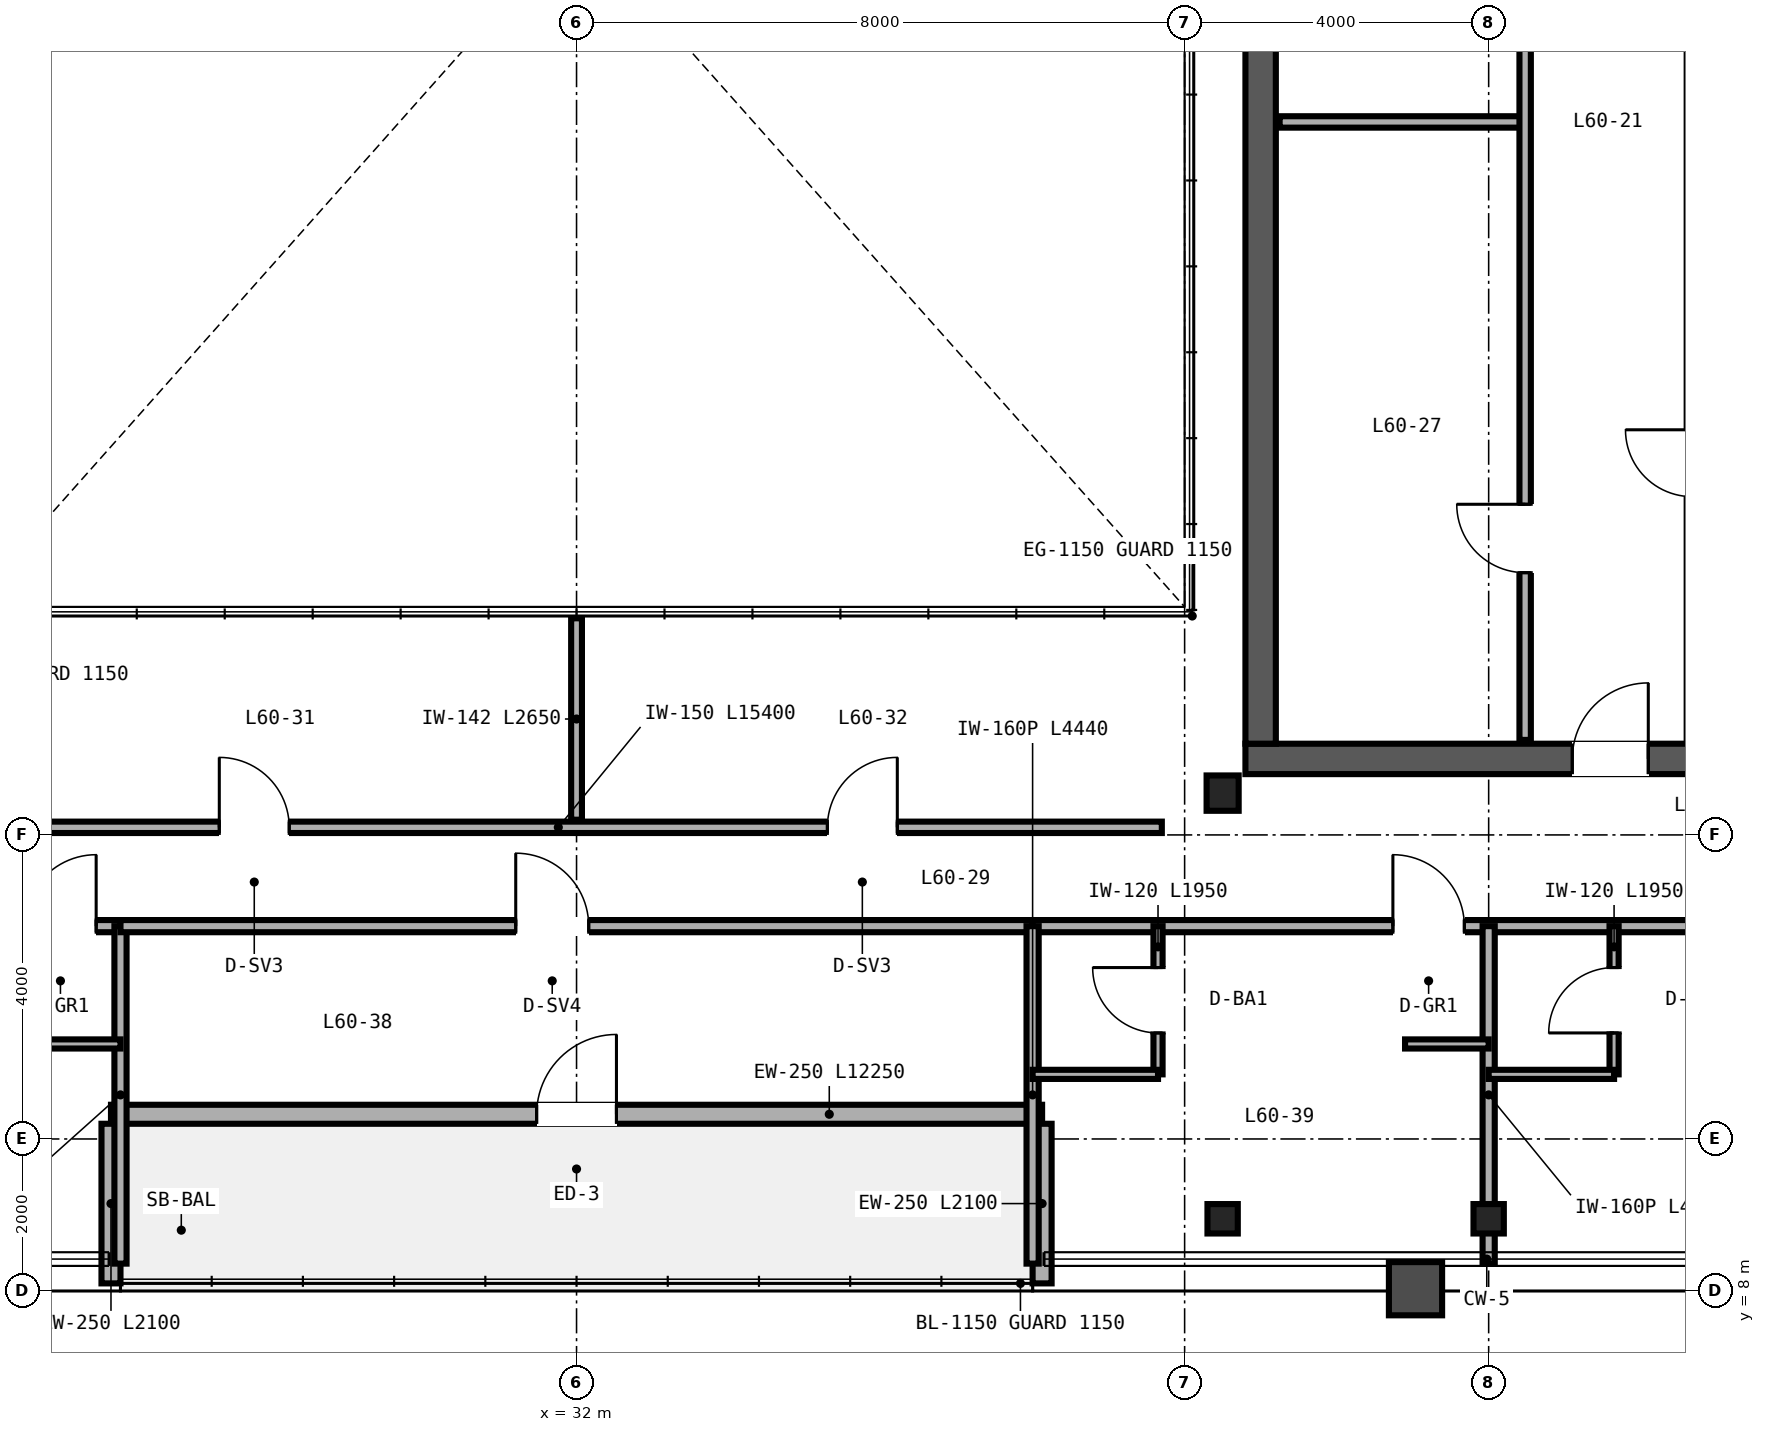
"""IFC4 building model, lengths in metres.
Left out: names, types, materials, properties, quantities, classifications, styles, units other than length and angle.
Written with IfcOpenShell. Run it as: python <this file> out.ifc"""

import sys

from ifc_helpers import new_model, si_unit, direction, frame, frame_2d, origin, origin_2d, place, context, subcontext, project, spatial, rectangle, i_section, extrude, source, transform, mapped, element, fill, save


model = new_model("IFC4")
c1 = context("Model", 3, precision=1e-05, world=origin(), true_north=direction((0.0, 1.0)))
c2 = subcontext(c1, "Body", "Model", "MODEL_VIEW")
j1 = project(units=[si_unit("LENGTHUNIT", "METRE"), si_unit("PLANEANGLEUNIT", "RADIAN")], contexts=[c1])
p1 = place(None, origin())
s1 = spatial("IfcSite", under=j1, at=p1, CompositionType="ELEMENT")
p2 = place(p1, origin())
s2 = spatial("IfcBuilding", under=s1, at=p2, CompositionType="ELEMENT")
p3 = place(p2, frame((0.0, 0.0, 240.0)))
s3 = spatial("IfcBuildingStorey", under=s2, at=p3, CompositionType="ELEMENT", Elevation=240.0)
p4 = place(p3, frame((40.8, 15.0, 0.0), z_axis=(0.0, 0.0, 1.0), x_axis=(1.0, 0.0, 0.0)))
e1 = element("IfcWall", 1, at=p4, inside=s3, PredefinedType="SHEAR", context=c2, shape_type="SweptSolid", body=[
    extrude(rectangle(XDim=12.4, YDim=0.4, at=frame_2d((6.2, 0.0))), origin(), (0.0, 0.0, 1.0), 3.38),
])
p5 = place(p4, frame((4.3, 0.0, 0.0)))
e2 = element("IfcOpeningElement", 2, at=p5, cuts=e1, PredefinedType="OPENING", context=c2, shape_type="SweptSolid", body=[
    extrude(rectangle(XDim=1.0, YDim=2.15, at=frame_2d((0.5, 1.075))), frame((0.0, 0.21, 0.0), z_axis=(0.0, -1.0, 0.0), x_axis=(1.0, 0.0, 0.0)), (0.0, 0.0, 1.0), 0.42),
])
p6 = place(p3, frame((41.0, 15.2, 0.0), z_axis=(0.0, 0.0, 1.0), x_axis=(0.0, 1.0, 0.0)))
e3 = element("IfcWall", 3, at=p6, inside=s3, PredefinedType="SHEAR", context=c2, shape_type="SweptSolid", body=[
    extrude(rectangle(XDim=21.6, YDim=0.4, at=frame_2d((10.8, 0.0))), origin(), (0.0, 0.0, 1.0), 3.38),
])
m1 = source(origin(), c2, "Body", "SweptSolid", [
    extrude(i_section(OverallWidth=0.422, OverallDepth=0.465, WebThickness=0.045, FlangeThickness=0.073, FilletRadius=0.025, at=origin_2d()), origin(), (0.0, 0.0, 1.0), 3.38),
])
p7 = place(p3, frame((40.5, 14.55, 0.0), z_axis=(0.0, 0.0, 1.0), x_axis=(1.0, 0.0, 0.0)))
e4 = element("IfcColumn", 4, at=p7, inside=s3, PredefinedType="COLUMN", context=c2, shape_type="MappedRepresentation", body=[
    mapped(m1, transform((0.0, 0.0, 0.0), scale=1.0)),
])
m2 = source(origin(), c2, "Body", "SweptSolid", [
    extrude(i_section(OverallWidth=0.399, OverallDepth=0.387, WebThickness=0.021, FlangeThickness=0.033, FilletRadius=0.025, at=origin_2d()), origin(), (0.0, 0.0, 1.0), 3.38),
])
for number, where, z_axis, x_axis in (
    (5, (40.5, 8.95, 0.0), (0.0, 0.0, 1.0), (1.0, 0.0, 0.0)),
    (6, (44.0, 8.95, 0.0), (0.0, 0.0, 1.0), (1.0, 0.0, 0.0)),
):
    element("IfcColumn", number, at=place(p3, frame(where, z_axis=z_axis, x_axis=x_axis)), inside=s3, PredefinedType="COLUMN", context=c2, shape_type="MappedRepresentation", body=[
        mapped(m2, transform((0.0, 0.0, 0.0), scale=1.0)),
    ])
p8 = place(p3, frame((25.875, 10.325, 0.0), z_axis=(0.0, 0.0, 1.0), x_axis=(1.0, 0.0, 0.0)))
e7 = element("IfcWall", 7, at=p8, inside=s3, PredefinedType="SOLIDWALL", context=c2, shape_type="SweptSolid", body=[
    extrude(rectangle(XDim=12.25, YDim=0.25, at=frame_2d((6.125, 0.0))), origin(), (0.0, 0.0, 1.0), 3.38),
])
p9 = place(p8, frame((5.6, 0.0, 0.0)))
e8 = element("IfcOpeningElement", 8, at=p9, cuts=e7, PredefinedType="OPENING", context=c2, shape_type="SweptSolid", body=[
    extrude(rectangle(XDim=1.05, YDim=2.15, at=frame_2d((0.525, 1.075))), frame((0.0, 0.135, 0.0), z_axis=(0.0, -1.0, 0.0), x_axis=(1.0, 0.0, 0.0)), (0.0, 0.0, 1.0), 0.27),
])
for number, where, z_axis, x_axis in (
    (9, (25.875, 8.1, 0.0), (0.0, 0.0, 1.0), (0.0, 1.0, 0.0)),
    (10, (38.125, 8.1, 0.0), (0.0, 0.0, 1.0), (0.0, 1.0, 0.0)),
):
    element("IfcWall", number, at=place(p3, frame(where, z_axis=z_axis, x_axis=x_axis)), inside=s3, PredefinedType="SOLIDWALL", context=c2, shape_type="SweptSolid", body=[
        extrude(rectangle(XDim=2.1, YDim=0.25, at=frame_2d((1.05, 0.0))), origin(), (0.0, 0.0, 1.0), 2.453),
    ])
p10 = place(p3, frame((41.25, 23.38, 0.0), z_axis=(0.0, 0.0, 1.0), x_axis=(1.0, 0.0, 0.0)))
e11 = element("IfcWall", 11, at=p10, inside=s3, PredefinedType="PARTITIONING", context=c2, shape_type="SweptSolid", body=[
    extrude(rectangle(XDim=3.23, YDim=0.15, at=frame_2d((1.615, 0.0))), origin(), (0.0, 0.0, 1.0), 3.38),
])
p11 = place(p3, frame((44.48, 15.25, 0.0), z_axis=(0.0, 0.0, 1.0), x_axis=(0.0, 1.0, 0.0)))
e12 = element("IfcWall", 12, at=p11, inside=s3, PredefinedType="PARTITIONING", context=c2, shape_type="SweptSolid", body=[
    extrude(rectangle(XDim=16.13, YDim=0.15, at=frame_2d((8.065, 0.0))), origin(), (0.0, 0.0, 1.0), 2.453),
])
p12 = place(p11, frame((2.2, 0.0, 0.0)))
e13 = element("IfcOpeningElement", 13, at=p12, cuts=e12, PredefinedType="OPENING", context=c2, shape_type="SweptSolid", body=[
    extrude(rectangle(XDim=0.9, YDim=2.15, at=frame_2d((0.45, 1.075))), frame((0.0, 0.085, 0.0), z_axis=(0.0, -1.0, 0.0), x_axis=(1.0, 0.0, 0.0)), (0.0, 0.0, 1.0), 0.17),
])
p13 = place(p11, frame((10.13, 0.0, 0.0)))
e14 = element("IfcOpeningElement", 14, at=p13, cuts=e12, PredefinedType="OPENING", context=c2, shape_type="SweptSolid", body=[
    extrude(rectangle(XDim=0.9, YDim=2.15, at=frame_2d((0.45, 1.075))), frame((0.0, 0.085, 0.0), z_axis=(0.0, -1.0, 0.0), x_axis=(1.0, 0.0, 0.0)), (0.0, 0.0, 1.0), 0.17),
])
p14 = place(p3, frame((32.0, 14.2, 0.0), z_axis=(0.0, 0.0, 1.0), x_axis=(0.0, 1.0, 0.0)))
e15 = element("IfcWall", 15, at=p14, inside=s3, PredefinedType="PARTITIONING", context=c2, shape_type="SweptSolid", body=[
    extrude(rectangle(XDim=2.65, YDim=0.142, at=frame_2d((1.325, 0.0))), origin(), (0.0, 0.0, 1.0), 3.38),
])
p15 = place(p3, frame((24.3, 14.1, 0.0), z_axis=(0.0, 0.0, 1.0), x_axis=(1.0, 0.0, 0.0)))
e16 = element("IfcWall", 16, at=p15, inside=s3, PredefinedType="PARTITIONING", context=c2, shape_type="SweptSolid", body=[
    extrude(rectangle(XDim=15.4, YDim=0.15, at=frame_2d((7.7, 0.0))), origin(), (0.0, 0.0, 1.0), 3.38),
])
p16 = place(p15, frame((3.0, 0.0, 0.0)))
e17 = element("IfcOpeningElement", 17, at=p16, cuts=e16, PredefinedType="OPENING", context=c2, shape_type="SweptSolid", body=[
    extrude(rectangle(XDim=0.92, YDim=2.15, at=frame_2d((0.46, 1.075))), frame((0.0, 0.085, 0.0), z_axis=(0.0, -1.0, 0.0), x_axis=(1.0, 0.0, 0.0)), (0.0, 0.0, 1.0), 0.17),
])
p17 = place(p15, frame((11.0, 0.0, 0.0)))
e18 = element("IfcOpeningElement", 18, at=p17, cuts=e16, PredefinedType="OPENING", context=c2, shape_type="SweptSolid", body=[
    extrude(rectangle(XDim=0.92, YDim=2.15, at=frame_2d((0.46, 1.075))), frame((0.0, 0.085, 0.0), z_axis=(0.0, -1.0, 0.0), x_axis=(1.0, 0.0, 0.0)), (0.0, 0.0, 1.0), 0.17),
])
p18 = place(p3, frame((14.0, 12.8, 0.0), z_axis=(0.0, 0.0, 1.0), x_axis=(1.0, 0.0, 0.0)))
e19 = element("IfcWall", 19, at=p18, inside=s3, PredefinedType="PARTITIONING", context=c2, shape_type="SweptSolid", body=[
    extrude(rectangle(XDim=12.0, YDim=0.16, at=frame_2d((6.0, 0.0))), origin(), (0.0, 0.0, 1.0), 2.923),
])
p19 = place(p18, frame((4.74, 0.0, 0.0)))
e20 = element("IfcOpeningElement", 20, at=p19, cuts=e19, PredefinedType="OPENING", context=c2, shape_type="SweptSolid", body=[
    extrude(rectangle(XDim=0.94, YDim=2.15, at=frame_2d((0.47, 1.075))), frame((0.0, 0.09, 0.0), z_axis=(0.0, -1.0, 0.0), x_axis=(1.0, 0.0, 0.0)), (0.0, 0.0, 1.0), 0.18),
])
p20 = place(p18, frame((10.74, 0.0, 0.0)))
e21 = element("IfcOpeningElement", 21, at=p20, cuts=e19, PredefinedType="OPENING", context=c2, shape_type="SweptSolid", body=[
    extrude(rectangle(XDim=0.94, YDim=2.15, at=frame_2d((0.47, 1.075))), frame((0.0, 0.09, 0.0), z_axis=(0.0, -1.0, 0.0), x_axis=(1.0, 0.0, 0.0)), (0.0, 0.0, 1.0), 0.18),
])
p21 = place(p3, frame((26.0, 8.36, 0.0), z_axis=(0.0, 0.0, 1.0), x_axis=(0.0, 1.0, 0.0)))
e22 = element("IfcWall", 22, at=p21, inside=s3, PredefinedType="PARTITIONING", context=c2, shape_type="SweptSolid", body=[
    extrude(rectangle(XDim=4.44, YDim=0.16, at=frame_2d((2.22, 0.0))), origin(), (0.0, 0.0, 1.0), 2.453),
])
p22 = place(p3, frame((24.9, 11.25, 0.0), z_axis=(0.0, 0.0, 1.0), x_axis=(1.0, 0.0, 0.0)))
e23 = element("IfcWall", 23, at=p22, inside=s3, PredefinedType="PARTITIONING", context=c2, shape_type="SweptSolid", body=[
    extrude(rectangle(XDim=1.1, YDim=0.12, at=frame_2d((0.55, 0.0))), origin(), (0.0, 0.0, 1.0), 3.38),
])
p23 = place(p3, frame((26.0, 12.8, 0.0), z_axis=(0.0, 0.0, 1.0), x_axis=(1.0, 0.0, 0.0)))
e24 = element("IfcWall", 24, at=p23, inside=s3, PredefinedType="PARTITIONING", context=c2, shape_type="SweptSolid", body=[
    extrude(rectangle(XDim=12.0, YDim=0.16, at=frame_2d((6.0, 0.0))), origin(), (0.0, 0.0, 1.0), 3.38),
])
p24 = place(p23, frame((5.2, 0.0, 0.0)))
e25 = element("IfcOpeningElement", 25, at=p24, cuts=e24, PredefinedType="OPENING", context=c2, shape_type="SweptSolid", body=[
    extrude(rectangle(XDim=0.96, YDim=2.15, at=frame_2d((0.48, 1.075))), frame((0.0, 0.09, 0.0), z_axis=(0.0, -1.0, 0.0), x_axis=(1.0, 0.0, 0.0)), (0.0, 0.0, 1.0), 0.18),
])
p25 = place(p3, frame((38.0, 12.8, 0.0), z_axis=(0.0, 0.0, 1.0), x_axis=(1.0, 0.0, 0.0)))
e26 = element("IfcWall", 26, at=p25, inside=s3, PredefinedType="PARTITIONING", context=c2, shape_type="SweptSolid", body=[
    extrude(rectangle(XDim=12.0, YDim=0.16, at=frame_2d((6.0, 0.0))), origin(), (0.0, 0.0, 1.0), 2.923),
])
p26 = place(p25, frame((4.74, 0.0, 0.0)))
e27 = element("IfcOpeningElement", 27, at=p26, cuts=e26, PredefinedType="OPENING", context=c2, shape_type="SweptSolid", body=[
    extrude(rectangle(XDim=0.94, YDim=2.15, at=frame_2d((0.47, 1.075))), frame((0.0, 0.09, 0.0), z_axis=(0.0, -1.0, 0.0), x_axis=(1.0, 0.0, 0.0)), (0.0, 0.0, 1.0), 0.18),
])
p27 = place(p25, frame((10.74, 0.0, 0.0)))
e28 = element("IfcOpeningElement", 28, at=p27, cuts=e26, PredefinedType="OPENING", context=c2, shape_type="SweptSolid", body=[
    extrude(rectangle(XDim=0.94, YDim=2.15, at=frame_2d((0.47, 1.075))), frame((0.0, 0.09, 0.0), z_axis=(0.0, -1.0, 0.0), x_axis=(1.0, 0.0, 0.0)), (0.0, 0.0, 1.0), 0.18),
])
p28 = place(p3, frame((38.0, 8.36, 0.0), z_axis=(0.0, 0.0, 1.0), x_axis=(0.0, 1.0, 0.0)))
e29 = element("IfcWall", 29, at=p28, inside=s3, PredefinedType="PARTITIONING", context=c2, shape_type="SweptSolid", body=[
    extrude(rectangle(XDim=4.44, YDim=0.16, at=frame_2d((2.22, 0.0))), origin(), (0.0, 0.0, 1.0), 2.453),
])
p29 = place(p3, frame((44.0, 8.36, 0.0), z_axis=(0.0, 0.0, 1.0), x_axis=(0.0, 1.0, 0.0)))
e30 = element("IfcWall", 30, at=p29, inside=s3, PredefinedType="PARTITIONING", context=c2, shape_type="SweptSolid", body=[
    extrude(rectangle(XDim=4.44, YDim=0.16, at=frame_2d((2.22, 0.0))), origin(), (0.0, 0.0, 1.0), 2.687),
])
p30 = place(p3, frame((39.65, 10.85, 0.0), z_axis=(0.0, 0.0, 1.0), x_axis=(0.0, 1.0, 0.0)))
e31 = element("IfcWall", 31, at=p30, inside=s3, PredefinedType="PARTITIONING", context=c2, shape_type="SweptSolid", body=[
    extrude(rectangle(XDim=1.95, YDim=0.12, at=frame_2d((0.975, 0.0))), origin(), (0.0, 0.0, 1.0), 3.38),
])
p31 = place(p30, frame((0.545, 0.0, 0.0)))
e32 = element("IfcOpeningElement", 32, at=p31, cuts=e31, PredefinedType="OPENING", context=c2, shape_type="SweptSolid", body=[
    extrude(rectangle(XDim=0.86, YDim=2.1, at=frame_2d((0.43, 1.05))), frame((0.0, 0.07, 0.0), z_axis=(0.0, -1.0, 0.0), x_axis=(1.0, 0.0, 0.0)), (0.0, 0.0, 1.0), 0.14),
])
p32 = place(p3, frame((38.0, 10.85, 0.0), z_axis=(0.0, 0.0, 1.0), x_axis=(1.0, 0.0, 0.0)))
e33 = element("IfcWall", 33, at=p32, inside=s3, PredefinedType="PARTITIONING", context=c2, shape_type="SweptSolid", body=[
    extrude(rectangle(XDim=1.65, YDim=0.12, at=frame_2d((0.825, 0.0))), origin(), (0.0, 0.0, 1.0), 3.38),
])
p33 = place(p3, frame((42.9, 11.25, 0.0), z_axis=(0.0, 0.0, 1.0), x_axis=(1.0, 0.0, 0.0)))
e34 = element("IfcWall", 34, at=p33, inside=s3, PredefinedType="PARTITIONING", context=c2, shape_type="SweptSolid", body=[
    extrude(rectangle(XDim=1.1, YDim=0.12, at=frame_2d((0.55, 0.0))), origin(), (0.0, 0.0, 1.0), 3.38),
])
p34 = place(p3, frame((45.65, 10.85, 0.0), z_axis=(0.0, 0.0, 1.0), x_axis=(0.0, 1.0, 0.0)))
e35 = element("IfcWall", 35, at=p34, inside=s3, PredefinedType="PARTITIONING", context=c2, shape_type="SweptSolid", body=[
    extrude(rectangle(XDim=1.95, YDim=0.12, at=frame_2d((0.975, 0.0))), origin(), (0.0, 0.0, 1.0), 3.38),
])
p35 = place(p34, frame((0.545, 0.0, 0.0)))
e36 = element("IfcOpeningElement", 36, at=p35, cuts=e35, PredefinedType="OPENING", context=c2, shape_type="SweptSolid", body=[
    extrude(rectangle(XDim=0.86, YDim=2.1, at=frame_2d((0.43, 1.05))), frame((0.0, 0.07, 0.0), z_axis=(0.0, -1.0, 0.0), x_axis=(1.0, 0.0, 0.0)), (0.0, 0.0, 1.0), 0.14),
])
p36 = place(p3, frame((44.0, 10.85, 0.0), z_axis=(0.0, 0.0, 1.0), x_axis=(1.0, 0.0, 0.0)))
e37 = element("IfcWall", 37, at=p36, inside=s3, PredefinedType="PARTITIONING", context=c2, shape_type="SweptSolid", body=[
    extrude(rectangle(XDim=1.65, YDim=0.12, at=frame_2d((0.825, 0.0))), origin(), (0.0, 0.0, 1.0), 3.38),
])
m3 = source(origin(), c2, "Body", "SweptSolid", [
    extrude(rectangle(XDim=1.05, YDim=2.15, at=frame_2d((0.525, 1.075))), frame((0.0, 0.025, 0.0), z_axis=(0.0, -1.0, 0.0), x_axis=(1.0, 0.0, 0.0)), (0.0, 0.0, 1.0), 0.05),
])
p37 = place(p9, origin())
e38 = element("IfcDoor", 38, at=p37, inside=s3, OperationType="SINGLE_SWING_RIGHT", PredefinedType="DOOR", context=c2, shape_type="MappedRepresentation", body=[
    mapped(m3, transform((0.0, 0.0, 0.0), scale=1.0)),
])
fill(e8, e38)
m4 = source(origin(), c2, "Body", "SweptSolid", [
    extrude(rectangle(XDim=1.0, YDim=2.15, at=frame_2d((0.5, 1.075))), frame((0.0, 0.025, 0.0), z_axis=(0.0, -1.0, 0.0), x_axis=(1.0, 0.0, 0.0)), (0.0, 0.0, 1.0), 0.05),
])
p38 = place(p5, origin())
e39 = element("IfcDoor", 39, at=p38, inside=s3, OperationType="SINGLE_SWING_RIGHT", PredefinedType="DOOR", context=c2, shape_type="MappedRepresentation", body=[
    mapped(m4, transform((0.0, 0.0, 0.0), scale=1.0)),
])
fill(e2, e39)
m5 = source(origin(), c2, "Body", "SweptSolid", [
    extrude(rectangle(XDim=0.9, YDim=2.15, at=frame_2d((0.45, 1.075))), frame((0.0, 0.025, 0.0), z_axis=(0.0, -1.0, 0.0), x_axis=(1.0, 0.0, 0.0)), (0.0, 0.0, 1.0), 0.05),
])
p39 = place(p12, origin())
e40 = element("IfcDoor", 40, at=p39, inside=s3, OperationType="SINGLE_SWING_RIGHT", PredefinedType="DOOR", context=c2, shape_type="MappedRepresentation", body=[
    mapped(m5, transform((0.0, 0.0, 0.0), scale=1.0)),
])
fill(e13, e40)
m6 = source(origin(), c2, "Body", "SweptSolid", [
    extrude(rectangle(XDim=0.92, YDim=2.15, at=frame_2d((0.46, 1.075))), frame((0.0, 0.025, 0.0), z_axis=(0.0, -1.0, 0.0), x_axis=(1.0, 0.0, 0.0)), (0.0, 0.0, 1.0), 0.05),
])
p40 = place(p16, origin())
e41 = element("IfcDoor", 41, at=p40, inside=s3, OperationType="SINGLE_SWING_LEFT", PredefinedType="DOOR", context=c2, shape_type="MappedRepresentation", body=[
    mapped(m6, transform((0.0, 0.0, 0.0), scale=1.0)),
])
fill(e17, e41)
p41 = place(p17, origin())
e42 = element("IfcDoor", 42, at=p41, inside=s3, OperationType="SINGLE_SWING_RIGHT", PredefinedType="DOOR", context=c2, shape_type="MappedRepresentation", body=[
    mapped(m6, transform((0.0, 0.0, 0.0), scale=1.0)),
])
fill(e18, e42)
m7 = source(origin(), c2, "Body", "SweptSolid", [
    extrude(rectangle(XDim=0.94, YDim=2.15, at=frame_2d((0.47, 1.075))), frame((0.0, 0.025, 0.0), z_axis=(0.0, -1.0, 0.0), x_axis=(1.0, 0.0, 0.0)), (0.0, 0.0, 1.0), 0.05),
])
p42 = place(p20, origin())
e43 = element("IfcDoor", 43, at=p42, inside=s3, OperationType="SINGLE_SWING_RIGHT", PredefinedType="DOOR", context=c2, shape_type="MappedRepresentation", body=[
    mapped(m7, transform((0.0, 0.0, 0.0), scale=1.0)),
])
fill(e21, e43)
m8 = source(origin(), c2, "Body", "SweptSolid", [
    extrude(rectangle(XDim=0.96, YDim=2.15, at=frame_2d((0.48, 1.075))), frame((0.0, 0.025, 0.0), z_axis=(0.0, -1.0, 0.0), x_axis=(1.0, 0.0, 0.0)), (0.0, 0.0, 1.0), 0.05),
])
p43 = place(p24, origin())
e44 = element("IfcDoor", 44, at=p43, inside=s3, OperationType="SINGLE_SWING_LEFT", PredefinedType="DOOR", context=c2, shape_type="MappedRepresentation", body=[
    mapped(m8, transform((0.0, 0.0, 0.0), scale=1.0)),
])
fill(e25, e44)
m9 = source(origin(), c2, "Body", "SweptSolid", [
    extrude(rectangle(XDim=0.86, YDim=2.1, at=frame_2d((0.43, 1.05))), frame((0.0, 0.025, 0.0), z_axis=(0.0, -1.0, 0.0), x_axis=(1.0, 0.0, 0.0)), (0.0, 0.0, 1.0), 0.05),
])
p44 = place(p31, origin())
e45 = element("IfcDoor", 45, at=p44, inside=s3, OperationType="SINGLE_SWING_RIGHT", PredefinedType="DOOR", context=c2, shape_type="MappedRepresentation", body=[
    mapped(m9, transform((0.0, 0.0, 0.0), scale=1.0)),
])
fill(e32, e45)
p45 = place(p35, origin())
e46 = element("IfcDoor", 46, at=p45, inside=s3, OperationType="SINGLE_SWING_LEFT", PredefinedType="DOOR", context=c2, shape_type="MappedRepresentation", body=[
    mapped(m9, transform((0.0, 0.0, 0.0), scale=1.0)),
])
fill(e36, e46)
p46 = place(p26, origin())
e47 = element("IfcDoor", 47, at=p46, inside=s3, OperationType="SINGLE_SWING_LEFT", PredefinedType="DOOR", context=c2, shape_type="MappedRepresentation", body=[
    mapped(m7, transform((0.0, 0.0, 0.0), scale=1.0)),
])
fill(e27, e47)
save(model, sys.argv[1])
